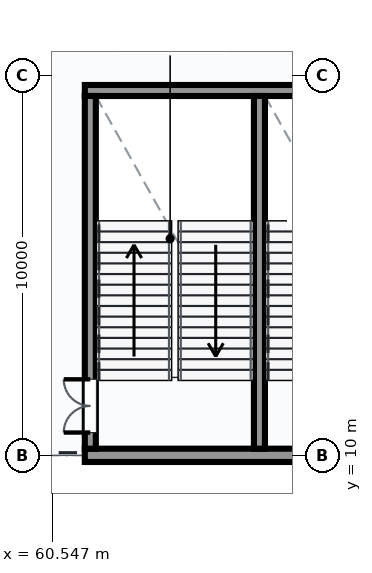
"""IFC4 building model, lengths in metres.
Left out: names, types, materials, properties, quantities, classifications, styles, units other than length and angle.
Written with IfcOpenShell. Run it as: python <this file> out.ifc"""

import sys

from ifc_helpers import new_model, si_unit, direction, frame, frame_2d, origin, place, context, subcontext, project, spatial, rectangle, extrude, element, fill, save


model = new_model("IFC4")
c1 = context("Model", 3, precision=1e-05, world=origin(), true_north=direction((0.0, 1.0)))
c2 = subcontext(c1, "Body", "Model", "MODEL_VIEW")
j1 = project(units=[si_unit("LENGTHUNIT", "METRE"), si_unit("PLANEANGLEUNIT", "RADIAN")], contexts=[c1])
p1 = place(None, origin())
s1 = spatial("IfcSite", under=j1, at=p1, CompositionType="ELEMENT")
p2 = place(p1, origin())
s2 = spatial("IfcBuilding", under=s1, at=p2, CompositionType="ELEMENT")
p3 = place(p2, frame((0.0, 0.0, 19.2)))
s3 = spatial("IfcBuildingStorey", under=s2, at=p3, CompositionType="ELEMENT", Elevation=19.2)
p4 = place(p3, frame((61.405, 10.0, 0.0), z_axis=(0.0, 0.0, 1.0), x_axis=(1.0, 0.0, 0.0)))
e1 = element("IfcWall", 1, at=p4, inside=s3, PredefinedType="SHEAR", context=c2, shape_type="SweptSolid", body=[
    extrude(rectangle(XDim=9.19, YDim=0.35, at=frame_2d((4.595, 0.0))), origin(), (0.0, 0.0, 1.0), 4.357),
])
p5 = place(p3, frame((61.405, 19.6, 0.0), z_axis=(0.0, 0.0, 1.0), x_axis=(1.0, 0.0, 0.0)))
e2 = element("IfcWall", 2, at=p5, inside=s3, PredefinedType="SHEAR", context=c2, shape_type="SweptSolid", body=[
    extrude(rectangle(XDim=9.19, YDim=0.29, at=frame_2d((4.595, 0.0))), origin(), (0.0, 0.0, 1.0), 5.4),
])
p6 = place(p3, frame((61.55, 10.175, 0.0), z_axis=(0.0, 0.0, 1.0), x_axis=(0.0, 1.0, 0.0)))
e3 = element("IfcWall", 3, at=p6, inside=s3, PredefinedType="SHEAR", context=c2, shape_type="SweptSolid", body=[
    extrude(rectangle(XDim=9.28, YDim=0.29, at=frame_2d((4.64, 0.0))), origin(), (0.0, 0.0, 1.0), 5.4),
])
p7 = place(p6, frame((0.425, 0.0, 0.0)))
e4 = element("IfcOpeningElement", 4, at=p7, cuts=e3, PredefinedType="OPENING", context=c2, shape_type="SweptSolid", body=[
    extrude(rectangle(XDim=1.4, YDim=2.2, at=frame_2d((0.7, 1.1))), frame((0.0, 0.155, 0.0), z_axis=(0.0, -1.0, 0.0), x_axis=(1.0, 0.0, 0.0)), (0.0, 0.0, 1.0), 0.31),
])
p8 = place(p3, frame((66.0, 10.175, 0.0), z_axis=(0.0, 0.0, 1.0), x_axis=(0.0, 1.0, 0.0)))
e5 = element("IfcWall", 5, at=p8, inside=s3, PredefinedType="SHEAR", context=c2, shape_type="SweptSolid", body=[
    extrude(rectangle(XDim=9.28, YDim=0.29, at=frame_2d((4.64, 0.0))), origin(), (0.0, 0.0, 1.0), 5.4),
])
p9 = place(p7, frame((1.4, 0.0, 0.0), z_axis=(0.0, 0.0, 1.0), x_axis=(-1.0, 0.0, 0.0)))
e6 = element("IfcDoor", 6, at=p9, inside=s3, OperationType="DOUBLE_DOOR_SINGLE_SWING", PredefinedType="DOOR", context=c2, shape_type="SweptSolid", body=[
    extrude(rectangle(XDim=1.4, YDim=2.2, at=frame_2d((0.7, 1.1))), frame((0.0, 0.025, 0.0), z_axis=(0.0, -1.0, 0.0), x_axis=(1.0, 0.0, 0.0)), (0.0, 0.0, 1.0), 0.05),
])
fill(e4, e6)
save(model, sys.argv[1])
